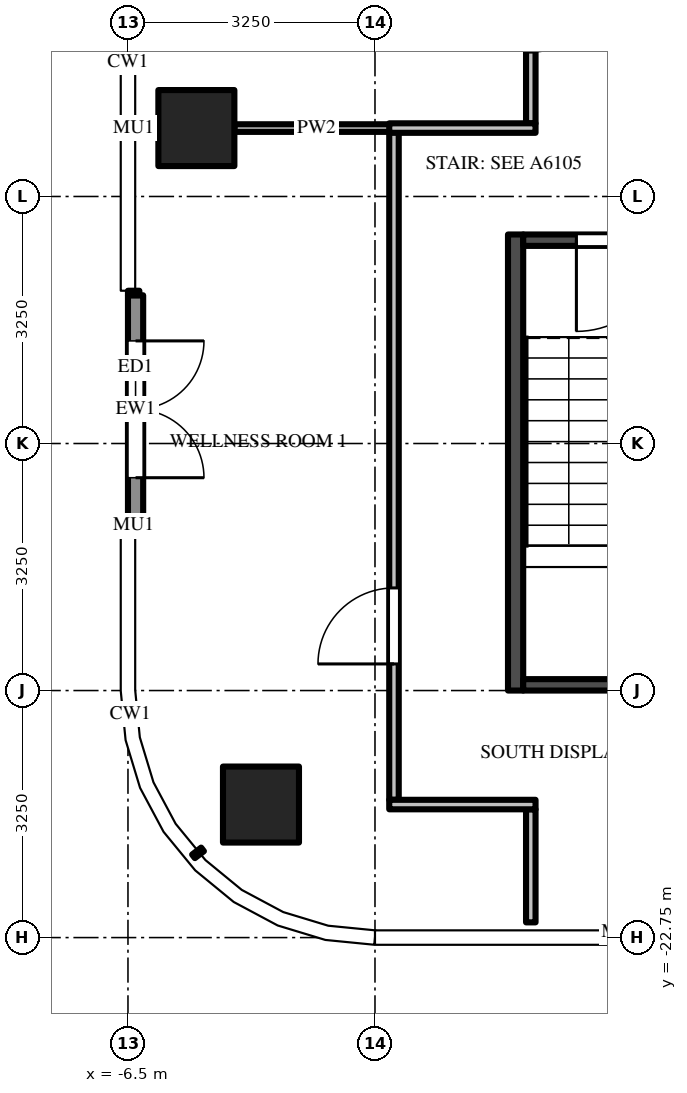
"""IFC4 building model, lengths in metres.
Left out: names, types, materials, properties, quantities, classifications, styles, units other than length and angle.
Written with IfcOpenShell. Run it as: python <this file> out.ifc"""

import sys

from ifc_helpers import new_model, si_unit, direction, frame, frame_2d, origin, origin_2d, place, context, subcontext, project, spatial, rectangle, extrude, source, transform, mapped, element, fill, save


model = new_model("IFC4")
c1 = context("Model", 3, precision=1e-05, world=origin(), true_north=direction((0.0, 1.0)))
c2 = subcontext(c1, "Body", "Model", "MODEL_VIEW")
j1 = project(units=[si_unit("LENGTHUNIT", "METRE"), si_unit("PLANEANGLEUNIT", "RADIAN")], contexts=[c1])
p1 = place(None, origin())
s1 = spatial("IfcSite", under=j1, at=p1, CompositionType="ELEMENT")
p2 = place(p1, origin())
s2 = spatial("IfcBuilding", under=s1, at=p2, CompositionType="ELEMENT")
p3 = place(p2, frame((0.0, 0.0, 306.7)))
s3 = spatial("IfcBuildingStorey", under=s2, at=p3, CompositionType="ELEMENT", Elevation=306.7)
m1 = source(origin(), c2, "Body", "SweptSolid", [
    extrude(rectangle(XDim=1.0, YDim=1.0, at=origin_2d()), origin(), (0.0, 0.0, 1.0), 3.9),
])
for number, where, z_axis, x_axis in (
    (1, (-5.6, -12.1, 0.0), (0.0, 0.0, 1.0), (1.0, 0.0, 0.0)),
    (2, (-4.75, -21.0, 0.0), (0.0, 0.0, 1.0), (1.0, 0.0, 0.0)),
):
    element("IfcColumn", number, at=place(p3, frame(where, z_axis=z_axis, x_axis=x_axis)), inside=s3, PredefinedType="COLUMN", context=c2, shape_type="MappedRepresentation", body=[
        mapped(m1, transform((0.0, 0.0, 0.0))),
    ])
m2 = source(origin(), c2, "Body", "SweptSolid", [
    extrude(rectangle(XDim=6.0, YDim=0.2, at=frame_2d((3.0, 0.0))), origin(), (0.0, 0.0, 1.0), 3.7),
])
p4 = place(p3, frame((-1.4, -13.5, 0.0), z_axis=(0.0, 0.0, 1.0), x_axis=(0.0, -1.0, 0.0)))
e3 = element("IfcWall", 3, at=p4, inside=s3, PredefinedType="SHEAR", context=c2, shape_type="MappedRepresentation", body=[
    mapped(m2, transform((0.0, 0.0, 0.0))),
])
m3 = source(origin(), c2, "Body", "SweptSolid", [
    extrude(rectangle(XDim=2.6, YDim=0.15, at=frame_2d((1.3, 0.0))), origin(), (0.0, 0.0, 1.0), 3.7),
])
p5 = place(p3, frame((1.3, -13.575, 0.0), z_axis=(0.0, 0.0, 1.0), x_axis=(-1.0, 0.0, 0.0)))
e4 = element("IfcWall", 4, at=p5, inside=s3, PredefinedType="SHEAR", context=c2, shape_type="MappedRepresentation", body=[
    mapped(m3, transform((0.0, 0.0, 0.0))),
])
m4 = source(origin(), c2, "Body", "SweptSolid", [
    extrude(rectangle(XDim=1.2, YDim=2.1, at=frame_2d((0.6, 1.05))), frame((0.0, 0.085, 0.0), z_axis=(0.0, -1.0, 0.0), x_axis=(1.0, 0.0, 0.0)), (0.0, 0.0, 1.0), 0.17),
])
p6 = place(p5, frame((0.7, 0.0, 0.0)))
e5 = element("IfcOpeningElement", 5, at=p6, cuts=e4, PredefinedType="OPENING", context=c2, shape_type="MappedRepresentation", body=[
    mapped(m4, transform((0.0, 0.0, 0.0))),
])
p7 = place(p3, frame((1.3, -19.425, 0.0), z_axis=(0.0, 0.0, 1.0), x_axis=(-1.0, 0.0, 0.0)))
e6 = element("IfcWall", 6, at=p7, inside=s3, PredefinedType="SHEAR", context=c2, shape_type="MappedRepresentation", body=[
    mapped(m3, transform((0.0, 0.0, 0.0))),
])
m5 = source(origin(), c2, "Body", "SweptSolid", [
    extrude(rectangle(XDim=3.0, YDim=0.2, at=frame_2d((1.5, 0.0))), origin(), (0.0, 0.0, 1.0), 3.7),
])
p8 = place(p3, frame((-6.4, -14.3, 0.0), z_axis=(0.0, 0.0, 1.0), x_axis=(0.0, -1.0, 0.0)))
e7 = element("IfcWall", 7, at=p8, inside=s3, PredefinedType="SOLIDWALL", context=c2, shape_type="MappedRepresentation", body=[
    mapped(m5, transform((0.0, 0.0, 0.0))),
])
m6 = source(origin(), c2, "Body", "SweptSolid", [
    extrude(rectangle(XDim=1.8, YDim=2.4, at=frame_2d((0.9, 1.2))), frame((0.0, 0.11, 0.0), z_axis=(0.0, -1.0, 0.0), x_axis=(1.0, 0.0, 0.0)), (0.0, 0.0, 1.0), 0.22),
])
p9 = place(p8, frame((0.6, 0.0, 0.0)))
e8 = element("IfcOpeningElement", 8, at=p9, cuts=e7, PredefinedType="OPENING", context=c2, shape_type="MappedRepresentation", body=[
    mapped(m6, transform((0.0, 0.0, 0.0))),
])
m7 = source(origin(), c2, "Body", "SweptSolid", [
    extrude(rectangle(XDim=8.788, YDim=0.125, at=frame_2d((4.394, 0.0))), origin(), (0.0, 0.0, 1.0), 2.78),
])
p10 = place(p3, frame((-3.0, -20.938, 0.0), z_axis=(0.0, 0.0, 1.0), x_axis=(0.0, 1.0, 0.0)))
e9 = element("IfcWall", 9, at=p10, inside=s3, PredefinedType="PARTITIONING", context=c2, shape_type="MappedRepresentation", body=[
    mapped(m7, transform((0.0, 0.0, 0.0))),
])
m8 = source(origin(), c2, "Body", "SweptSolid", [
    extrude(rectangle(XDim=1.0, YDim=2.1, at=frame_2d((0.5, 1.05))), frame((0.0, 0.073, 0.0), z_axis=(0.0, -1.0, 0.0), x_axis=(1.0, 0.0, 0.0)), (0.0, 0.0, 1.0), 0.145),
])
p11 = place(p10, frame((1.788, 0.0, 0.0)))
e10 = element("IfcOpeningElement", 10, at=p11, cuts=e9, PredefinedType="OPENING", context=c2, shape_type="MappedRepresentation", body=[
    mapped(m8, transform((0.0, 0.0, 0.0))),
])
m9 = source(origin(), c2, "Body", "SweptSolid", [
    extrude(rectangle(XDim=1.488, YDim=0.125, at=frame_2d((0.744, 0.0))), origin(), (0.0, 0.0, 1.0), 2.78),
])
p12 = place(p3, frame((-1.2, -21.062, 0.0), z_axis=(0.0, 0.0, 1.0), x_axis=(0.0, -1.0, 0.0)))
e11 = element("IfcWall", 11, at=p12, inside=s3, PredefinedType="PARTITIONING", context=c2, shape_type="MappedRepresentation", body=[
    mapped(m9, transform((0.0, 0.0, 0.0))),
])
m10 = source(origin(), c2, "Body", "SweptSolid", [
    extrude(rectangle(XDim=5.475, YDim=0.125, at=frame_2d((2.738, 0.0))), origin(), (0.0, 0.0, 1.0), 2.997),
])
p13 = place(p3, frame((-1.2, -6.562, 0.0), z_axis=(0.0, 0.0, 1.0), x_axis=(0.0, -1.0, 0.0)))
e12 = element("IfcWall", 12, at=p13, inside=s3, PredefinedType="PARTITIONING", context=c2, shape_type="MappedRepresentation", body=[
    mapped(m10, transform((0.0, 0.0, 0.0))),
])
p14 = place(p13, frame((3.538, 0.0, 0.0)))
e13 = element("IfcOpeningElement", 13, at=p14, cuts=e12, PredefinedType="OPENING", context=c2, shape_type="MappedRepresentation", body=[
    mapped(m8, transform((0.0, 0.0, 0.0))),
])
m11 = source(origin(), c2, "Body", "SweptSolid", [
    extrude(rectangle(XDim=1.925, YDim=0.125, at=frame_2d((0.962, 0.0))), origin(), (0.0, 0.0, 1.0), 2.78),
])
p15 = place(p3, frame((-1.137, -21.0, 0.0), z_axis=(0.0, 0.0, 1.0), x_axis=(-1.0, 0.0, 0.0)))
e14 = element("IfcWall", 14, at=p15, inside=s3, PredefinedType="PARTITIONING", context=c2, shape_type="MappedRepresentation", body=[
    mapped(m11, transform((0.0, 0.0, 0.0))),
])
m12 = source(origin(), c2, "Body", "SweptSolid", [
    extrude(rectangle(XDim=2.163, YDim=0.1, at=frame_2d((1.081, 0.0))), origin(), (0.0, 0.0, 1.0), 2.997),
])
p16 = place(p3, frame((-5.1, -12.1, 0.0), z_axis=(0.0, 0.0, 1.0), x_axis=(1.0, 0.0, 0.0)))
e15 = element("IfcWall", 15, at=p16, inside=s3, PredefinedType="PARTITIONING", context=c2, shape_type="MappedRepresentation", body=[
    mapped(m12, transform((0.0, 0.0, 0.0))),
])
m13 = source(origin(), c2, "Body", "SweptSolid", [
    extrude(rectangle(XDim=1.925, YDim=0.125, at=frame_2d((0.962, 0.0))), origin(), (0.0, 0.0, 1.0), 2.997),
])
p17 = place(p3, frame((-3.062, -12.1, 0.0), z_axis=(0.0, 0.0, 1.0), x_axis=(1.0, 0.0, 0.0)))
e16 = element("IfcWall", 16, at=p17, inside=s3, PredefinedType="PARTITIONING", context=c2, shape_type="MappedRepresentation", body=[
    mapped(m13, transform((0.0, 0.0, 0.0))),
])
m14 = source(origin(), c2, "Body", "SweptSolid", [
    extrude(rectangle(XDim=1.2, YDim=2.1, at=frame_2d((0.6, 1.05))), frame((0.0, 0.025, 0.0), z_axis=(0.0, -1.0, 0.0), x_axis=(1.0, 0.0, 0.0)), (0.0, 0.0, 1.0), 0.05),
])
p18 = place(p6, origin())
e17 = element("IfcDoor", 17, at=p18, inside=s3, OperationType="SINGLE_SWING_RIGHT", PredefinedType="DOOR", context=c2, shape_type="MappedRepresentation", body=[
    mapped(m14, transform((0.0, 0.0, 0.0))),
])
fill(e5, e17)
m15 = source(origin(), c2, "Body", "SweptSolid", [
    extrude(rectangle(XDim=1.8, YDim=2.4, at=frame_2d((0.9, 1.2))), frame((0.0, 0.025, 0.0), z_axis=(0.0, -1.0, 0.0), x_axis=(1.0, 0.0, 0.0)), (0.0, 0.0, 1.0), 0.05),
])
p19 = place(p9, origin())
e18 = element("IfcDoor", 18, at=p19, inside=s3, OperationType="DOUBLE_DOOR_SINGLE_SWING", PredefinedType="DOOR", context=c2, shape_type="MappedRepresentation", body=[
    mapped(m15, transform((0.0, 0.0, 0.0))),
])
fill(e8, e18)
m16 = source(origin(), c2, "Body", "SweptSolid", [
    extrude(rectangle(XDim=1.0, YDim=2.1, at=frame_2d((0.5, 1.05))), frame((0.0, 0.025, 0.0), z_axis=(0.0, -1.0, 0.0), x_axis=(1.0, 0.0, 0.0)), (0.0, 0.0, 1.0), 0.05),
])
p20 = place(p11, origin())
e19 = element("IfcDoor", 19, at=p20, inside=s3, OperationType="SINGLE_SWING_LEFT", PredefinedType="DOOR", context=c2, shape_type="MappedRepresentation", body=[
    mapped(m16, transform((0.0, 0.0, 0.0))),
])
fill(e10, e19)
save(model, sys.argv[1])
